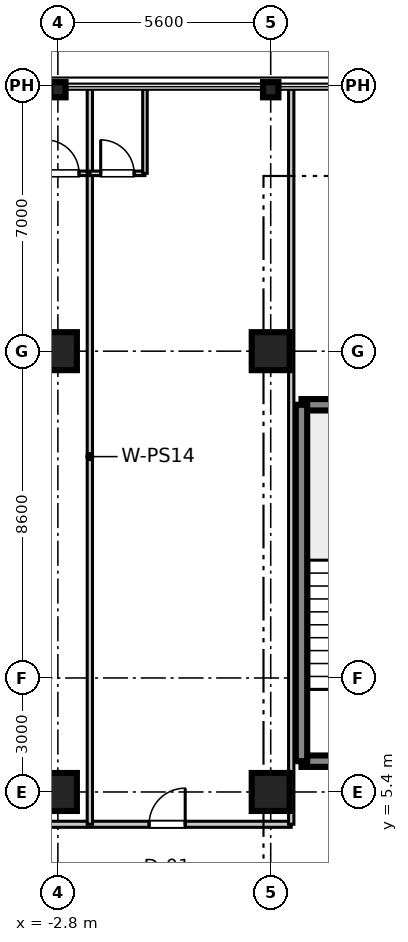
"""IFC4 building model, lengths in metres.
Left out: names, types, materials, properties, quantities, classifications, styles, units other than length and angle.
Written with IfcOpenShell. Run it as: python <this file> out.ifc"""

import sys

from ifc_helpers import new_model, si_unit, direction, frame, frame_2d, origin, origin_2d, place, context, subcontext, project, spatial, rectangle, i_section, extrude, source, transform, mapped, element, fill, save


model = new_model("IFC4")
c1 = context("Model", 3, precision=1e-05, world=origin(), true_north=direction((0.0, 1.0)))
c2 = subcontext(c1, "Body", "Model", "MODEL_VIEW")
j1 = project(units=[si_unit("LENGTHUNIT", "METRE"), si_unit("PLANEANGLEUNIT", "RADIAN")], contexts=[c1])
p1 = place(None, origin())
s1 = spatial("IfcSite", under=j1, at=p1, CompositionType="ELEMENT")
p2 = place(p1, origin())
s2 = spatial("IfcBuilding", under=s1, at=p2, CompositionType="ELEMENT")
p3 = place(p2, frame((0.0, 0.0, 219.7)))
s3 = spatial("IfcBuildingStorey", under=s2, at=p3, CompositionType="ELEMENT", Elevation=219.7)
m1 = source(origin(), c2, "Body", "SweptSolid", [
    extrude(rectangle(XDim=1.0, YDim=1.0, at=origin_2d()), origin(), (0.0, 0.0, 1.0), 3.655),
])
for number, where, z_axis, x_axis in (
    (1, (-2.8, 5.4, 0.0), (0.0, 0.0, 1.0), (1.0, 0.0, 0.0)),
    (2, (-2.8, 17.0, 0.0), (0.0, 0.0, 1.0), (1.0, 0.0, 0.0)),
    (3, (2.8, 5.4, 0.0), (0.0, 0.0, 1.0), (1.0, 0.0, 0.0)),
    (4, (2.8, 17.0, 0.0), (0.0, 0.0, 1.0), (1.0, 0.0, 0.0)),
):
    element("IfcColumn", number, at=place(p3, frame(where, z_axis=z_axis, x_axis=x_axis)), inside=s3, PredefinedType="COLUMN", context=c2, shape_type="MappedRepresentation", body=[
        mapped(m1, transform((0.0, 0.0, 0.0), scale=1.0)),
    ])
m2 = source(origin(), c2, "Body", "SweptSolid", [
    extrude(i_section(OverallWidth=0.401, OverallDepth=0.406, WebThickness=0.016, FlangeThickness=0.025, at=origin_2d()), origin(), (0.0, 0.0, 1.0), 3.655),
])
for number, where, z_axis, x_axis in (
    (5, (-2.8, 23.88, 0.0), (0.0, 0.0, 1.0), (0.0, 1.0, 0.0)),
    (6, (2.8, 23.88, 0.0), (0.0, 0.0, 1.0), (0.0, 1.0, 0.0)),
):
    element("IfcColumn", number, at=place(p3, frame(where, z_axis=z_axis, x_axis=x_axis)), inside=s3, PredefinedType="COLUMN", context=c2, shape_type="MappedRepresentation", body=[
        mapped(m2, transform((0.0, 0.0, 0.0), scale=1.0)),
    ])
m3 = source(origin(), c2, "Body", "SweptSolid", [
    extrude(rectangle(XDim=3.98, YDim=0.3, at=frame_2d((1.99, 0.0))), origin(), (0.0, 0.0, 1.0), 3.41),
])
for number, where, z_axis, x_axis in (
    (7, (3.61, 6.21, 0.0), (0.0, 0.0, 1.0), (1.0, 0.0, 0.0)),
    (8, (3.61, 15.59, 0.0), (0.0, 0.0, 1.0), (1.0, 0.0, 0.0)),
):
    element("IfcWall", number, at=place(p3, frame(where, z_axis=z_axis, x_axis=x_axis)), inside=s3, PredefinedType="SHEAR", context=c2, shape_type="MappedRepresentation", body=[
        mapped(m3, transform((0.0, 0.0, 0.0), scale=1.0)),
    ])
m4 = source(origin(), c2, "Body", "SweptSolid", [
    extrude(rectangle(XDim=9.38, YDim=0.3, at=frame_2d((4.69, 0.0))), origin(), (0.0, 0.0, 1.0), 3.41),
])
p4 = place(p3, frame((3.61, 6.21, 0.0), z_axis=(0.0, 0.0, 1.0), x_axis=(0.0, 1.0, 0.0)))
e9 = element("IfcWall", 9, at=p4, inside=s3, PredefinedType="SHEAR", context=c2, shape_type="MappedRepresentation", body=[
    mapped(m4, transform((0.0, 0.0, 0.0), scale=1.0)),
])
m5 = source(origin(), c2, "Body", "SweptSolid", [
    extrude(rectangle(XDim=10.19, YDim=0.16, at=frame_2d((5.095, 0.0))), origin(), (0.0, 0.0, 1.0), 2.75),
])
p5 = place(p3, frame((-6.85, 4.55, 0.0), z_axis=(0.0, 0.0, 1.0), x_axis=(1.0, 0.0, 0.0)))
e10 = element("IfcWall", 10, at=p5, inside=s3, PredefinedType="PARTITIONING", context=c2, shape_type="MappedRepresentation", body=[
    mapped(m5, transform((0.0, 0.0, 0.0), scale=1.0)),
])
p6 = place(p5, frame((0.745, 0.0, 0.0)))
e11 = element("IfcOpeningElement", 11, at=p6, cuts=e10, PredefinedType="OPENING", context=c2, shape_type="SweptSolid", body=[
    extrude(rectangle(XDim=0.95, YDim=2.1, at=frame_2d((0.475, 1.05))), frame((0.0, 0.09, 0.0), z_axis=(0.0, -1.0, 0.0), x_axis=(1.0, 0.0, 0.0)), (0.0, 0.0, 1.0), 0.18),
])
p7 = place(p5, frame((6.45, 0.0, 0.0)))
e12 = element("IfcOpeningElement", 12, at=p7, cuts=e10, PredefinedType="OPENING", context=c2, shape_type="SweptSolid", body=[
    extrude(rectangle(XDim=0.95, YDim=2.1, at=frame_2d((0.475, 1.05))), frame((0.0, 0.09, 0.0), z_axis=(0.0, -1.0, 0.0), x_axis=(1.0, 0.0, 0.0)), (0.0, 0.0, 1.0), 0.18),
])
m6 = source(origin(), c2, "Body", "SweptSolid", [
    extrude(rectangle(XDim=19.35, YDim=0.14, at=frame_2d((9.675, 0.0))), origin(), (0.0, 0.0, 1.0), 2.75),
])
p8 = place(p3, frame((3.34, 4.55, 0.0), z_axis=(0.0, 0.0, 1.0), x_axis=(0.0, 1.0, 0.0)))
e13 = element("IfcWall", 13, at=p8, inside=s3, PredefinedType="PARTITIONING", context=c2, shape_type="MappedRepresentation", body=[
    mapped(m6, transform((0.0, 0.0, 0.0), scale=1.0)),
])
m7 = source(origin(), c2, "Body", "SweptSolid", [
    extrude(rectangle(XDim=1.45, YDim=0.12, at=frame_2d((0.725, 0.0))), origin(), (0.0, 0.0, 1.0), 2.75),
])
p9 = place(p3, frame((-3.409, 21.68, 0.0), z_axis=(0.0, 0.0, 1.0), x_axis=(1.0, 0.0, 0.0)))
e14 = element("IfcWall", 14, at=p9, inside=s3, PredefinedType="PARTITIONING", context=c2, shape_type="MappedRepresentation", body=[
    mapped(m7, transform((0.0, 0.0, 0.0), scale=1.0)),
])
p10 = place(p9, frame((0.285, 0.0, 0.0)))
e15 = element("IfcOpeningElement", 15, at=p10, cuts=e14, PredefinedType="OPENING", context=c2, shape_type="SweptSolid", body=[
    extrude(rectangle(XDim=0.88, YDim=2.1, at=frame_2d((0.44, 1.05))), frame((0.0, 0.07, 0.0), z_axis=(0.0, -1.0, 0.0), x_axis=(1.0, 0.0, 0.0)), (0.0, 0.0, 1.0), 0.14),
])
p11 = place(p3, frame((-1.959, 4.55, 0.0), z_axis=(0.0, 0.0, 1.0), x_axis=(0.0, 1.0, 0.0)))
e16 = element("IfcWall", 16, at=p11, inside=s3, PredefinedType="PARTITIONING", context=c2, shape_type="MappedRepresentation", body=[
    mapped(m6, transform((0.0, 0.0, 0.0), scale=1.0)),
])
p12 = place(p3, frame((-1.959, 21.68, 0.0), z_axis=(0.0, 0.0, 1.0), x_axis=(1.0, 0.0, 0.0)))
e17 = element("IfcWall", 17, at=p12, inside=s3, PredefinedType="PARTITIONING", context=c2, shape_type="MappedRepresentation", body=[
    mapped(m7, transform((0.0, 0.0, 0.0), scale=1.0)),
])
p13 = place(p12, frame((0.285, 0.0, 0.0)))
e18 = element("IfcOpeningElement", 18, at=p13, cuts=e17, PredefinedType="OPENING", context=c2, shape_type="SweptSolid", body=[
    extrude(rectangle(XDim=0.88, YDim=2.1, at=frame_2d((0.44, 1.05))), frame((0.0, 0.07, 0.0), z_axis=(0.0, -1.0, 0.0), x_axis=(1.0, 0.0, 0.0)), (0.0, 0.0, 1.0), 0.14),
])
m8 = source(origin(), c2, "Body", "SweptSolid", [
    extrude(rectangle(XDim=2.22, YDim=0.12, at=frame_2d((1.11, 0.0))), origin(), (0.0, 0.0, 1.0), 2.75),
])
p14 = place(p3, frame((-0.509, 21.68, 0.0), z_axis=(0.0, 0.0, 1.0), x_axis=(0.0, 1.0, 0.0)))
e19 = element("IfcWall", 19, at=p14, inside=s3, PredefinedType="PARTITIONING", context=c2, shape_type="MappedRepresentation", body=[
    mapped(m8, transform((0.0, 0.0, 0.0), scale=1.0)),
])
m9 = source(origin(), c2, "Body", "SweptSolid", [
    extrude(rectangle(XDim=0.88, YDim=2.1, at=frame_2d((0.44, 1.05))), frame((0.0, 0.025, 0.0), z_axis=(0.0, -1.0, 0.0), x_axis=(1.0, 0.0, 0.0)), (0.0, 0.0, 1.0), 0.05),
])
p15 = place(p10, origin())
e20 = element("IfcDoor", 20, at=p15, inside=s3, OperationType="SINGLE_SWING_LEFT", PredefinedType="DOOR", context=c2, shape_type="MappedRepresentation", body=[
    mapped(m9, transform((0.0, 0.0, 0.0), scale=1.0)),
])
fill(e15, e20)
p16 = place(p13, origin())
e21 = element("IfcDoor", 21, at=p16, inside=s3, OperationType="SINGLE_SWING_LEFT", PredefinedType="DOOR", context=c2, shape_type="MappedRepresentation", body=[
    mapped(m9, transform((0.0, 0.0, 0.0), scale=1.0)),
])
fill(e18, e21)
m10 = source(origin(), c2, "Body", "SweptSolid", [
    extrude(rectangle(XDim=0.95, YDim=2.1, at=frame_2d((0.475, 1.05))), frame((0.0, 0.025, 0.0), z_axis=(0.0, -1.0, 0.0), x_axis=(1.0, 0.0, 0.0)), (0.0, 0.0, 1.0), 0.05),
])
p17 = place(p7, origin())
e22 = element("IfcDoor", 22, at=p17, inside=s3, OperationType="SINGLE_SWING_RIGHT", PredefinedType="DOOR", context=c2, shape_type="MappedRepresentation", body=[
    mapped(m10, transform((0.0, 0.0, 0.0), scale=1.0)),
])
fill(e12, e22)
save(model, sys.argv[1])
